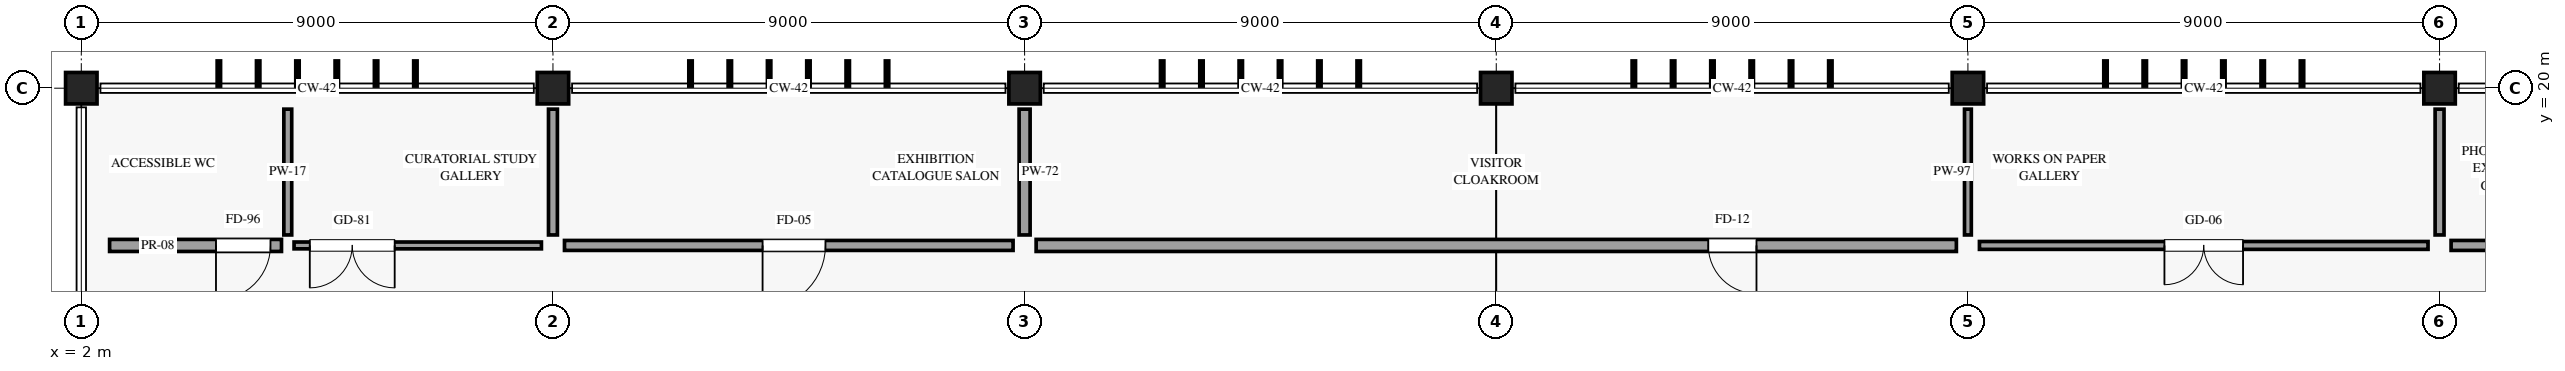
"""IFC4 building model, lengths in metres.
Left out: names, types, materials, properties, quantities, classifications, styles, units other than length and angle.
Written with IfcOpenShell. Run it as: python <this file> out.ifc"""

import sys

from ifc_helpers import new_model, si_unit, direction, frame, frame_2d, origin, origin_2d, place, context, subcontext, project, spatial, rectangle, extrude, element, fill, save


model = new_model("IFC4")
c1 = context("Model", 3, precision=1e-05, world=origin(), true_north=direction((0.0, 1.0)))
c2 = subcontext(c1, "Body", "Model", "MODEL_VIEW")
j1 = project(units=[si_unit("LENGTHUNIT", "METRE"), si_unit("PLANEANGLEUNIT", "RADIAN")], contexts=[c1])
p1 = place(None, origin())
s1 = spatial("IfcSite", under=j1, at=p1, CompositionType="ELEMENT")
p2 = place(p1, origin())
s2 = spatial("IfcBuilding", under=s1, at=p2, CompositionType="ELEMENT")
p3 = place(p2, frame((0.0, 0.0, 15.0)))
s3 = spatial("IfcBuildingStorey", under=s2, at=p3, CompositionType="ELEMENT", Elevation=15.0)
for number, where, z_axis, x_axis in (
    (1, (2.0, 20.0, 0.0), (0.0, 0.0, 1.0), (1.0, 0.0, 0.0)),
    (2, (11.0, 20.0, 0.0), (0.0, 0.0, 1.0), (1.0, 0.0, 0.0)),
    (3, (20.0, 20.0, 0.0), (0.0, 0.0, 1.0), (1.0, 0.0, 0.0)),
    (4, (29.0, 20.0, 0.0), (0.0, 0.0, 1.0), (1.0, 0.0, 0.0)),
    (5, (38.0, 20.0, 0.0), (0.0, 0.0, 1.0), (1.0, 0.0, 0.0)),
    (6, (47.0, 20.0, 0.0), (0.0, 0.0, 1.0), (1.0, 0.0, 0.0)),
):
    element("IfcColumn", number, at=place(p3, frame(where, z_axis=z_axis, x_axis=x_axis)), inside=s3, PredefinedType="COLUMN", context=c2, shape_type="SweptSolid", body=[
        extrude(rectangle(XDim=0.6, YDim=0.6, at=origin_2d()), origin(), (0.0, 0.0, 1.0), 4.5),
    ])
p4 = place(p3, frame((2.54, 17.0, 0.0), z_axis=(0.0, 0.0, 1.0), x_axis=(1.0, 0.0, 0.0)))
e7 = element("IfcWall", 7, at=p4, inside=s3, PredefinedType="PARTITIONING", context=c2, shape_type="SweptSolid", body=[
    extrude(rectangle(XDim=3.28, YDim=0.23, at=frame_2d((1.64, 0.0))), origin(), (0.0, 0.0, 1.0), 3.805),
])
p5 = place(p4, frame((3.07, 0.0, 0.0), z_axis=(0.0, 0.0, 1.0), x_axis=(-1.0, 0.0, 0.0)))
e8 = element("IfcOpeningElement", 8, at=p5, cuts=e7, PredefinedType="OPENING", context=c2, shape_type="SweptSolid", body=[
    extrude(rectangle(XDim=1.04, YDim=2.22, at=frame_2d((0.52, 1.11))), frame((0.0, 0.125, 0.0), z_axis=(0.0, -1.0, 0.0), x_axis=(1.0, 0.0, 0.0)), (0.0, 0.0, 1.0), 0.25),
])
p6 = place(p3, frame((6.06, 17.0, 0.0), z_axis=(0.0, 0.0, 1.0), x_axis=(1.0, 0.0, 0.0)))
e9 = element("IfcWall", 9, at=p6, inside=s3, PredefinedType="PARTITIONING", context=c2, shape_type="SweptSolid", body=[
    extrude(rectangle(XDim=4.72, YDim=0.13, at=frame_2d((2.36, 0.0))), origin(), (0.0, 0.0, 1.0), 3.575),
])
p7 = place(p6, frame((1.92, 0.0, 0.0), z_axis=(0.0, 0.0, 1.0), x_axis=(-1.0, 0.0, 0.0)))
e10 = element("IfcOpeningElement", 10, at=p7, cuts=e9, PredefinedType="OPENING", context=c2, shape_type="SweptSolid", body=[
    extrude(rectangle(XDim=1.62, YDim=2.4, at=frame_2d((0.81, 1.2))), frame((0.0, 0.075, 0.0), z_axis=(0.0, -1.0, 0.0), x_axis=(1.0, 0.0, 0.0)), (0.0, 0.0, 1.0), 0.15),
])
p8 = place(p3, frame((5.94, 17.2, 0.0), z_axis=(0.0, 0.0, 1.0), x_axis=(0.0, 1.0, 0.0)))
e11 = element("IfcWall", 11, at=p8, inside=s3, PredefinedType="PARTITIONING", context=c2, shape_type="SweptSolid", body=[
    extrude(rectangle(XDim=2.4, YDim=0.15, at=frame_2d((1.2, 0.0))), origin(), (0.0, 0.0, 1.0), 4.18),
])
p9 = place(p3, frame((11.0, 17.2, 0.0), z_axis=(0.0, 0.0, 1.0), x_axis=(0.0, 1.0, 0.0)))
e12 = element("IfcWall", 12, at=p9, inside=s3, PredefinedType="PARTITIONING", context=c2, shape_type="SweptSolid", body=[
    extrude(rectangle(XDim=2.4, YDim=0.17, at=frame_2d((1.2, 0.0))), origin(), (0.0, 0.0, 1.0), 3.575),
])
p10 = place(p3, frame((11.22, 17.0, 0.0), z_axis=(0.0, 0.0, 1.0), x_axis=(1.0, 0.0, 0.0)))
e13 = element("IfcWall", 13, at=p10, inside=s3, PredefinedType="PARTITIONING", context=c2, shape_type="SweptSolid", body=[
    extrude(rectangle(XDim=8.56, YDim=0.19, at=frame_2d((4.28, 0.0))), origin(), (0.0, 0.0, 1.0), 3.575),
])
p11 = place(p10, frame((4.98, 0.0, 0.0), z_axis=(0.0, 0.0, 1.0), x_axis=(-1.0, 0.0, 0.0)))
e14 = element("IfcOpeningElement", 14, at=p11, cuts=e13, PredefinedType="OPENING", context=c2, shape_type="SweptSolid", body=[
    extrude(rectangle(XDim=1.2, YDim=2.3, at=frame_2d((0.6, 1.15))), frame((0.0, 0.105, 0.0), z_axis=(0.0, -1.0, 0.0), x_axis=(1.0, 0.0, 0.0)), (0.0, 0.0, 1.0), 0.21),
])
p12 = place(p3, frame((20.0, 17.2, 0.0), z_axis=(0.0, 0.0, 1.0), x_axis=(0.0, 1.0, 0.0)))
e15 = element("IfcWall", 15, at=p12, inside=s3, PredefinedType="PARTITIONING", context=c2, shape_type="SweptSolid", body=[
    extrude(rectangle(XDim=2.4, YDim=0.21, at=frame_2d((1.2, 0.0))), origin(), (0.0, 0.0, 1.0), 3.575),
])
p13 = place(p3, frame((20.22, 17.0, 0.0), z_axis=(0.0, 0.0, 1.0), x_axis=(1.0, 0.0, 0.0)))
e16 = element("IfcWall", 16, at=p13, inside=s3, PredefinedType="PARTITIONING", context=c2, shape_type="SweptSolid", body=[
    extrude(rectangle(XDim=17.56, YDim=0.23, at=frame_2d((8.78, 0.0))), origin(), (0.0, 0.0, 1.0), 3.575),
])
p14 = place(p13, frame((13.746, 0.0, 0.0), z_axis=(0.0, 0.0, 1.0), x_axis=(-1.0, 0.0, 0.0)))
e17 = element("IfcOpeningElement", 17, at=p14, cuts=e16, PredefinedType="OPENING", context=c2, shape_type="SweptSolid", body=[
    extrude(rectangle(XDim=0.92, YDim=2.12, at=frame_2d((0.46, 1.06))), frame((0.0, 0.125, 0.0), z_axis=(0.0, -1.0, 0.0), x_axis=(1.0, 0.0, 0.0)), (0.0, 0.0, 1.0), 0.25),
])
p15 = place(p3, frame((38.0, 17.2, 0.0), z_axis=(0.0, 0.0, 1.0), x_axis=(0.0, 1.0, 0.0)))
e18 = element("IfcWall", 18, at=p15, inside=s3, PredefinedType="PARTITIONING", context=c2, shape_type="SweptSolid", body=[
    extrude(rectangle(XDim=2.4, YDim=0.13, at=frame_2d((1.2, 0.0))), origin(), (0.0, 0.0, 1.0), 3.575),
])
p16 = place(p3, frame((38.22, 17.0, 0.0), z_axis=(0.0, 0.0, 1.0), x_axis=(1.0, 0.0, 0.0)))
e19 = element("IfcWall", 19, at=p16, inside=s3, PredefinedType="PARTITIONING", context=c2, shape_type="SweptSolid", body=[
    extrude(rectangle(XDim=8.56, YDim=0.15, at=frame_2d((4.28, 0.0))), origin(), (0.0, 0.0, 1.0), 3.575),
])
p17 = place(p16, frame((5.03, 0.0, 0.0), z_axis=(0.0, 0.0, 1.0), x_axis=(-1.0, 0.0, 0.0)))
e20 = element("IfcOpeningElement", 20, at=p17, cuts=e19, PredefinedType="OPENING", context=c2, shape_type="SweptSolid", body=[
    extrude(rectangle(XDim=1.5, YDim=2.35, at=frame_2d((0.75, 1.175))), frame((0.0, 0.085, 0.0), z_axis=(0.0, -1.0, 0.0), x_axis=(1.0, 0.0, 0.0)), (0.0, 0.0, 1.0), 0.17),
])
p18 = place(p3, frame((47.0, 17.2, 0.0), z_axis=(0.0, 0.0, 1.0), x_axis=(0.0, 1.0, 0.0)))
e21 = element("IfcWall", 21, at=p18, inside=s3, PredefinedType="PARTITIONING", context=c2, shape_type="SweptSolid", body=[
    extrude(rectangle(XDim=2.4, YDim=0.17, at=frame_2d((1.2, 0.0))), origin(), (0.0, 0.0, 1.0), 3.575),
])
p19 = place(p3, frame((47.22, 17.0, 0.0), z_axis=(0.0, 0.0, 1.0), x_axis=(1.0, 0.0, 0.0)))
e22 = element("IfcWall", 22, at=p19, inside=s3, PredefinedType="PARTITIONING", context=c2, shape_type="SweptSolid", body=[
    extrude(rectangle(XDim=9.78, YDim=0.19, at=frame_2d((4.89, 0.0))), origin(), (0.0, 0.0, 1.0), 3.575),
])
p20 = place(p19, frame((5.114, 0.0, 0.0), z_axis=(0.0, 0.0, 1.0), x_axis=(-1.0, 0.0, 0.0)))
e23 = element("IfcOpeningElement", 23, at=p20, cuts=e22, PredefinedType="OPENING", context=c2, shape_type="SweptSolid", body=[
    extrude(rectangle(XDim=1.58, YDim=2.38, at=frame_2d((0.79, 1.19))), frame((0.0, 0.105, 0.0), z_axis=(0.0, -1.0, 0.0), x_axis=(1.0, 0.0, 0.0)), (0.0, 0.0, 1.0), 0.21),
])
p21 = place(p5, origin())
e24 = element("IfcDoor", 24, at=p21, inside=s3, OperationType="SINGLE_SWING_RIGHT", PredefinedType="DOOR", context=c2, shape_type="SweptSolid", body=[
    extrude(rectangle(XDim=1.04, YDim=2.22, at=frame_2d((0.52, 1.11))), frame((0.0, 0.025, 0.0), z_axis=(0.0, -1.0, 0.0), x_axis=(1.0, 0.0, 0.0)), (0.0, 0.0, 1.0), 0.05),
])
fill(e8, e24)
p22 = place(p7, origin())
e25 = element("IfcDoor", 25, at=p22, inside=s3, OperationType="DOUBLE_DOOR_SINGLE_SWING", PredefinedType="DOOR", context=c2, shape_type="SweptSolid", body=[
    extrude(rectangle(XDim=1.62, YDim=2.4, at=frame_2d((0.81, 1.2))), frame((0.0, 0.025, 0.0), z_axis=(0.0, -1.0, 0.0), x_axis=(1.0, 0.0, 0.0)), (0.0, 0.0, 1.0), 0.05),
])
fill(e10, e25)
p23 = place(p11, origin())
e26 = element("IfcDoor", 26, at=p23, inside=s3, OperationType="SINGLE_SWING_RIGHT", PredefinedType="DOOR", context=c2, shape_type="SweptSolid", body=[
    extrude(rectangle(XDim=1.2, YDim=2.3, at=frame_2d((0.6, 1.15))), frame((0.0, 0.025, 0.0), z_axis=(0.0, -1.0, 0.0), x_axis=(1.0, 0.0, 0.0)), (0.0, 0.0, 1.0), 0.05),
])
fill(e14, e26)
p24 = place(p14, origin())
e27 = element("IfcDoor", 27, at=p24, inside=s3, OperationType="SINGLE_SWING_LEFT", PredefinedType="DOOR", context=c2, shape_type="SweptSolid", body=[
    extrude(rectangle(XDim=0.92, YDim=2.12, at=frame_2d((0.46, 1.06))), frame((0.0, 0.025, 0.0), z_axis=(0.0, -1.0, 0.0), x_axis=(1.0, 0.0, 0.0)), (0.0, 0.0, 1.0), 0.05),
])
fill(e17, e27)
p25 = place(p17, origin())
e28 = element("IfcDoor", 28, at=p25, inside=s3, OperationType="DOUBLE_DOOR_SINGLE_SWING", PredefinedType="DOOR", context=c2, shape_type="SweptSolid", body=[
    extrude(rectangle(XDim=1.5, YDim=2.35, at=frame_2d((0.75, 1.175))), frame((0.0, 0.025, 0.0), z_axis=(0.0, -1.0, 0.0), x_axis=(1.0, 0.0, 0.0)), (0.0, 0.0, 1.0), 0.05),
])
fill(e20, e28)
save(model, sys.argv[1])
